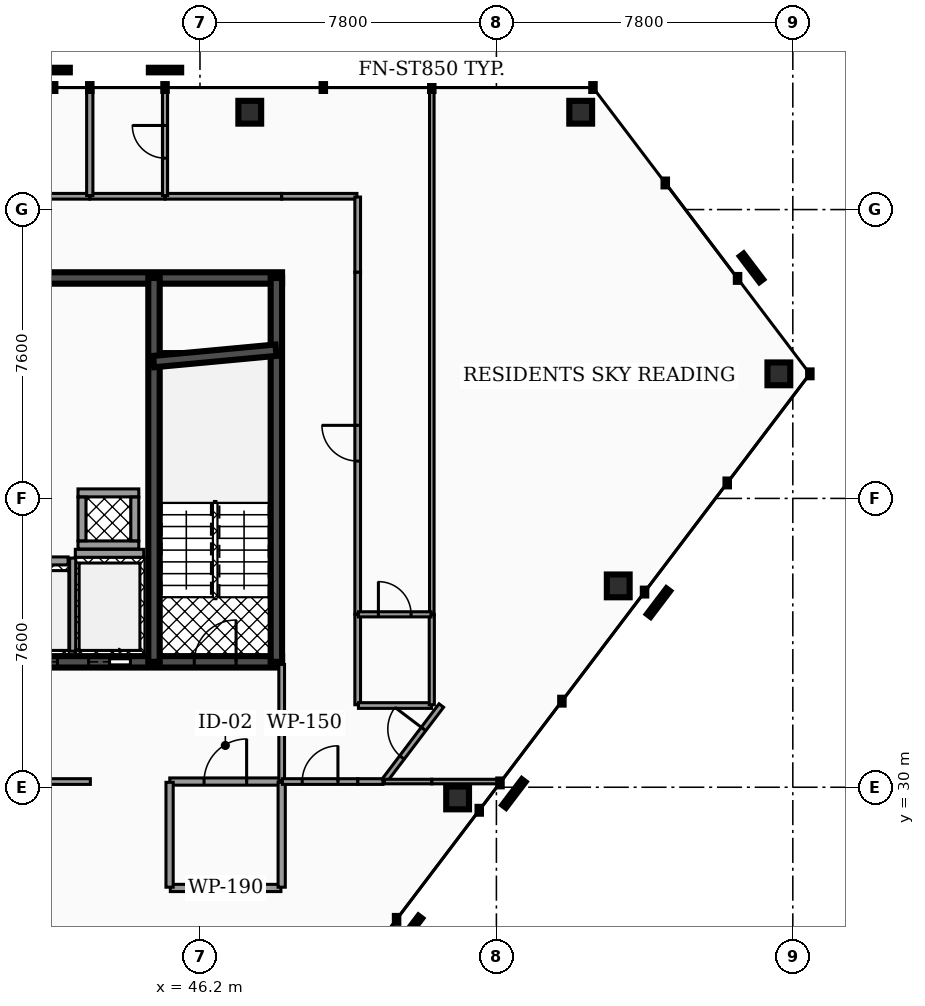
"""IFC4 building model, lengths in metres.
Left out: names, types, materials, properties, quantities, classifications, styles, units other than length and angle.
Written with IfcOpenShell. Run it as: python <this file> out.ifc"""

import sys

from ifc_helpers import new_model, si_unit, direction, frame, frame_2d, origin, origin_2d, place, context, subcontext, project, spatial, rectangle, hollow_rectangle, extrude, element, fill, save


model = new_model("IFC4")
c1 = context("Model", 3, precision=1e-05, world=origin(), true_north=direction((0.0, 1.0)))
c2 = subcontext(c1, "Body", "Model", "MODEL_VIEW")
j1 = project(units=[si_unit("LENGTHUNIT", "METRE"), si_unit("PLANEANGLEUNIT", "RADIAN")], contexts=[c1])
p1 = place(None, origin())
s1 = spatial("IfcSite", under=j1, at=p1, CompositionType="ELEMENT")
p2 = place(p1, origin())
s2 = spatial("IfcBuilding", under=s1, at=p2, CompositionType="ELEMENT")
p3 = place(p2, frame((0.0, 0.0, 212.16)))
s3 = spatial("IfcBuildingStorey", under=s2, at=p3, CompositionType="ELEMENT", Elevation=212.16)
p4 = place(p3, frame((28.5, 43.4, 0.0), z_axis=(0.0, 0.0, 1.0), x_axis=(1.0, 0.0, 0.0)))
e1 = element("IfcWall", 1, at=p4, inside=s3, PredefinedType="SHEAR", context=c2, shape_type="SweptSolid", body=[
    extrude(rectangle(XDim=19.86, YDim=0.3, at=frame_2d((9.93, 0.0))), origin(), (0.0, 0.0, 1.0), 3.18),
])
p5 = place(p3, frame((28.5, 33.3, 0.0), z_axis=(0.0, 0.0, 1.0), x_axis=(1.0, 0.0, 0.0)))
e2 = element("IfcWall", 2, at=p5, inside=s3, PredefinedType="SHEAR", context=c2, shape_type="SweptSolid", body=[
    extrude(rectangle(XDim=19.86, YDim=0.3, at=frame_2d((9.93, 0.0))), origin(), (0.0, 0.0, 1.0), 3.18),
])
p6 = place(p5, frame((3.93, 0.0, 0.0)))
e3 = element("IfcOpeningElement", 3, at=p6, cuts=e2, PredefinedType="OPENING", context=c2, shape_type="SweptSolid", body=[
    extrude(rectangle(XDim=1.1, YDim=2.15, at=frame_2d((0.55, 1.075))), frame((0.0, 0.16, 0.0), z_axis=(0.0, -1.0, 0.0), x_axis=(1.0, 0.0, 0.0)), (0.0, 0.0, 1.0), 0.32),
])
p7 = place(p5, frame((14.77, 0.0, 0.0)))
e4 = element("IfcOpeningElement", 4, at=p7, cuts=e2, PredefinedType="OPENING", context=c2, shape_type="SweptSolid", body=[
    extrude(rectangle(XDim=1.1, YDim=2.15, at=frame_2d((0.55, 1.075))), frame((0.0, 0.16, 0.0), z_axis=(0.0, -1.0, 0.0), x_axis=(1.0, 0.0, 0.0)), (0.0, 0.0, 1.0), 0.32),
])
p8 = place(p5, frame((11.25, 0.0, 0.0)))
e5 = element("IfcOpeningElement", 5, at=p8, cuts=e2, PredefinedType="OPENING", context=c2, shape_type="SweptSolid", body=[
    extrude(rectangle(XDim=1.0, YDim=2.1, at=frame_2d((0.5, 1.05))), frame((0.0, 0.16, 0.0), z_axis=(0.0, -1.0, 0.0), x_axis=(1.0, 0.0, 0.0)), (0.0, 0.0, 1.0), 0.32),
])
p9 = place(p5, frame((12.95, 0.0, 0.0)))
e6 = element("IfcOpeningElement", 6, at=p9, cuts=e2, PredefinedType="OPENING", context=c2, shape_type="SweptSolid", body=[
    extrude(rectangle(XDim=1.0, YDim=2.1, at=frame_2d((0.5, 1.05))), frame((0.0, 0.16, 0.0), z_axis=(0.0, -1.0, 0.0), x_axis=(1.0, 0.0, 0.0)), (0.0, 0.0, 1.0), 0.32),
])
p10 = place(p5, frame((5.85, 0.0, 0.0)))
e7 = element("IfcOpeningElement", 7, at=p10, cuts=e2, PredefinedType="OPENING", context=c2, shape_type="SweptSolid", body=[
    extrude(rectangle(XDim=1.0, YDim=2.1, at=frame_2d((0.5, 1.05))), frame((0.0, 0.16, 0.0), z_axis=(0.0, -1.0, 0.0), x_axis=(1.0, 0.0, 0.0)), (0.0, 0.0, 1.0), 0.32),
])
p11 = place(p5, frame((1.21, 0.0, 0.0)))
e8 = element("IfcOpeningElement", 8, at=p11, cuts=e2, PredefinedType="OPENING", context=c2, shape_type="SweptSolid", body=[
    extrude(rectangle(XDim=1.1, YDim=2.2, at=frame_2d((0.55, 1.1))), frame((0.0, 0.16, 0.0), z_axis=(0.0, -1.0, 0.0), x_axis=(1.0, 0.0, 0.0)), (0.0, 0.0, 1.0), 0.32),
])
p12 = place(p5, frame((9.34, 0.0, 0.0)))
e9 = element("IfcOpeningElement", 9, at=p12, cuts=e2, PredefinedType="OPENING", context=c2, shape_type="SweptSolid", body=[
    extrude(rectangle(XDim=1.12, YDim=2.05, at=frame_2d((0.56, 1.025))), frame((0.0, 0.16, 0.0), z_axis=(0.0, -1.0, 0.0), x_axis=(1.0, 0.0, 0.0)), (0.0, 0.0, 1.0), 0.32),
])
p13 = place(p5, frame((17.55, 0.0, 0.0)))
e10 = element("IfcOpeningElement", 10, at=p13, cuts=e2, PredefinedType="OPENING", context=c2, shape_type="SweptSolid", body=[
    extrude(rectangle(XDim=1.1, YDim=2.2, at=frame_2d((0.55, 1.1))), frame((0.0, 0.16, 0.0), z_axis=(0.0, -1.0, 0.0), x_axis=(1.0, 0.0, 0.0)), (0.0, 0.0, 1.0), 0.32),
])
for number, where, z_axis, x_axis in (
    (11, (44.99, 33.3, 0.0), (0.0, 0.0, 1.0), (0.0, 1.0, 0.0)),
    (12, (48.21, 33.3, 0.0), (0.0, 0.0, 1.0), (0.0, 1.0, 0.0)),
):
    element("IfcWall", number, at=place(p3, frame(where, z_axis=z_axis, x_axis=x_axis)), inside=s3, PredefinedType="SHEAR", context=c2, shape_type="SweptSolid", body=[
        extrude(rectangle(XDim=10.1, YDim=0.3, at=frame_2d((5.05, 0.0))), origin(), (0.0, 0.0, 1.0), 3.18),
    ])
p14 = place(p3, frame((44.98, 41.2, 0.0), z_axis=(0.0, 0.0, 1.0), x_axis=(0.995686468965, 0.09278176286, 0.0)))
e13 = element("IfcWall", 13, at=p14, inside=s3, PredefinedType="SHEAR", context=c2, shape_type="SweptSolid", body=[
    extrude(rectangle(XDim=3.234, YDim=0.3, at=frame_2d((1.617, 0.0))), origin(), (0.0, 0.0, 1.0), 3.18),
])
for number, where, z_axis, x_axis in (
    (14, (56.218, 47.761, 0.0), (0.0, 0.0, 1.0), (1.0, 0.0, 0.0)),
    (15, (47.51, 47.761, 0.0), (0.0, 0.0, 1.0), (1.0, 0.0, 0.0)),
    (16, (52.979, 29.719, 0.0), (0.0, 0.0, 1.0), (1.0, 0.0, 0.0)),
    (17, (57.206, 35.298, 0.0), (0.0, 0.0, 1.0), (1.0, 0.0, 0.0)),
    (18, (61.433, 40.878, 0.0), (0.0, 0.0, 1.0), (1.0, 0.0, 0.0)),
):
    element("IfcColumn", number, at=place(p3, frame(where, z_axis=z_axis, x_axis=x_axis)), inside=s3, PredefinedType="COLUMN", context=c2, shape_type="SweptSolid", body=[
        extrude(hollow_rectangle(XDim=0.6, YDim=0.6, WallThickness=0.03, at=origin_2d()), origin(), (0.0, 0.0, 1.0), 3.18),
    ])
p15 = place(p3, frame((42.92, 36.155, 0.0), z_axis=(0.0, 0.0, 1.0), x_axis=(1.0, 0.0, 0.0)))
e19 = element("IfcWall", 19, at=p15, inside=s3, PredefinedType="SOLIDWALL", context=c2, shape_type="SweptSolid", body=[
    extrude(rectangle(XDim=1.8, YDim=0.21, at=frame_2d((0.9, 0.0))), origin(), (0.0, 0.0, 1.0), 3.18),
])
p16 = place(p3, frame((42.85, 33.58, 0.0), z_axis=(0.0, 0.0, 1.0), x_axis=(0.0, 1.0, 0.0)))
e20 = element("IfcWall", 20, at=p16, inside=s3, PredefinedType="SOLIDWALL", context=c2, shape_type="SweptSolid", body=[
    extrude(rectangle(XDim=2.45, YDim=0.16, at=frame_2d((1.225, 0.0))), origin(), (0.0, 0.0, 1.0), 3.18),
])
p17 = place(p3, frame((41.17, 35.955, 0.0), z_axis=(0.0, 0.0, 1.0), x_axis=(1.0, 0.0, 0.0)))
e21 = element("IfcWall", 21, at=p17, inside=s3, PredefinedType="SOLIDWALL", context=c2, shape_type="SweptSolid", body=[
    extrude(rectangle(XDim=1.56, YDim=0.21, at=frame_2d((0.78, 0.0))), origin(), (0.0, 0.0, 1.0), 3.18),
])
for number, where, z_axis, x_axis in (
    (22, (42.99, 36.375, 0.0), (0.0, 0.0, 1.0), (1.0, 0.0, 0.0)),
    (23, (42.99, 37.745, 0.0), (0.0, 0.0, 1.0), (1.0, 0.0, 0.0)),
):
    element("IfcWall", number, at=place(p3, frame(where, z_axis=z_axis, x_axis=x_axis)), inside=s3, PredefinedType="SOLIDWALL", context=c2, shape_type="SweptSolid", body=[
        extrude(rectangle(XDim=1.6, YDim=0.21, at=frame_2d((0.8, 0.0))), origin(), (0.0, 0.0, 1.0), 3.18),
    ])
for number, where, z_axis, x_axis in (
    (24, (43.095, 36.485, 0.0), (0.0, 0.0, 1.0), (0.0, 1.0, 0.0)),
    (25, (44.485, 36.485, 0.0), (0.0, 0.0, 1.0), (0.0, 1.0, 0.0)),
):
    element("IfcWall", number, at=place(p3, frame(where, z_axis=z_axis, x_axis=x_axis)), inside=s3, PredefinedType="SOLIDWALL", context=c2, shape_type="SweptSolid", body=[
        extrude(rectangle(XDim=1.15, YDim=0.21, at=frame_2d((0.575, 0.0))), origin(), (0.0, 0.0, 1.0), 3.18),
    ])
p18 = place(p3, frame((45.405, 30.15, 0.0), z_axis=(0.0, 0.0, 1.0), x_axis=(1.0, 0.0, 0.0)))
e26 = element("IfcWall", 26, at=p18, inside=s3, PredefinedType="PARTITIONING", context=c2, shape_type="SweptSolid", body=[
    extrude(rectangle(XDim=2.925, YDim=0.19, at=frame_2d((1.462, 0.0))), origin(), (0.0, 0.0, 1.0), 2.235),
])
p19 = place(p18, frame((0.903, 0.0, 0.0)))
e27 = element("IfcOpeningElement", 27, at=p19, cuts=e26, PredefinedType="OPENING", context=c2, shape_type="SweptSolid", body=[
    extrude(rectangle(XDim=1.12, YDim=2.05, at=frame_2d((0.56, 1.025))), frame((0.0, 0.105, 0.0), z_axis=(0.0, -1.0, 0.0), x_axis=(1.0, 0.0, 0.0)), (0.0, 0.0, 1.0), 0.21),
])
p20 = place(p3, frame((48.35, 30.17, 0.0), z_axis=(0.0, 0.0, 1.0), x_axis=(0.0, 1.0, 0.0)))
e28 = element("IfcWall", 28, at=p20, inside=s3, PredefinedType="PARTITIONING", context=c2, shape_type="SweptSolid", body=[
    extrude(rectangle(XDim=3.06, YDim=0.15, at=frame_2d((1.53, 0.0))), origin(), (0.0, 0.0, 1.0), 2.235),
])
p21 = place(p3, frame((33.485, 30.15, 0.0), z_axis=(0.0, 0.0, 1.0), x_axis=(1.0, 0.0, 0.0)))
e29 = element("IfcWall", 29, at=p21, inside=s3, PredefinedType="PARTITIONING", context=c2, shape_type="SweptSolid", body=[
    extrude(rectangle(XDim=9.83, YDim=0.15, at=frame_2d((4.915, 0.0))), origin(), (0.0, 0.0, 1.0), 2.235),
])
p22 = place(p21, frame((0.445, 0.0, 0.0)))
e30 = element("IfcOpeningElement", 30, at=p22, cuts=e29, PredefinedType="OPENING", context=c2, shape_type="SweptSolid", body=[
    extrude(rectangle(XDim=0.94, YDim=2.05, at=frame_2d((0.47, 1.025))), frame((0.0, 0.085, 0.0), z_axis=(0.0, -1.0, 0.0), x_axis=(1.0, 0.0, 0.0)), (0.0, 0.0, 1.0), 0.17),
])
p23 = place(p3, frame((45.42, 27.35, 0.0), z_axis=(0.0, 0.0, 1.0), x_axis=(1.0, 0.0, 0.0)))
e31 = element("IfcWall", 31, at=p23, inside=s3, PredefinedType="PARTITIONING", context=c2, shape_type="SweptSolid", body=[
    extrude(rectangle(XDim=2.91, YDim=0.19, at=frame_2d((1.455, 0.0))), origin(), (0.0, 0.0, 1.0), 2.235),
])
for number, where, z_axis, x_axis in (
    (32, (45.4, 27.37, 0.0), (0.0, 0.0, 1.0), (0.0, 1.0, 0.0)),
    (33, (48.35, 27.37, 0.0), (0.0, 0.0, 1.0), (0.0, 1.0, 0.0)),
):
    element("IfcWall", number, at=place(p3, frame(where, z_axis=z_axis, x_axis=x_axis)), inside=s3, PredefinedType="PARTITIONING", context=c2, shape_type="SweptSolid", body=[
        extrude(rectangle(XDim=2.76, YDim=0.19, at=frame_2d((1.38, 0.0))), origin(), (0.0, 0.0, 1.0), 2.235),
    ])
p24 = place(p3, frame((50.35, 30.15, 0.0), z_axis=(0.0, 0.0, 1.0), x_axis=(1.0, 0.0, 0.0)))
e34 = element("IfcWall", 34, at=p24, inside=s3, PredefinedType="PARTITIONING", context=c2, shape_type="SweptSolid", body=[
    extrude(rectangle(XDim=0.665, YDim=0.15, at=frame_2d((0.333, 0.0))), origin(), (0.0, 0.0, 1.0), 2.235),
])
p25 = place(p3, frame((48.37, 30.15, 0.0), z_axis=(0.0, 0.0, 1.0), x_axis=(1.0, 0.0, 0.0)))
e35 = element("IfcWall", 35, at=p25, inside=s3, PredefinedType="PARTITIONING", context=c2, shape_type="SweptSolid", body=[
    extrude(rectangle(XDim=1.98, YDim=0.15, at=frame_2d((0.99, 0.0))), origin(), (0.0, 0.0, 1.0), 2.235),
])
p26 = place(p25, frame((0.52, 0.0, 0.0)))
e36 = element("IfcOpeningElement", 36, at=p26, cuts=e35, PredefinedType="OPENING", context=c2, shape_type="SweptSolid", body=[
    extrude(rectangle(XDim=0.94, YDim=2.05, at=frame_2d((0.47, 1.025))), frame((0.0, 0.085, 0.0), z_axis=(0.0, -1.0, 0.0), x_axis=(1.0, 0.0, 0.0)), (0.0, 0.0, 1.0), 0.17),
])
p27 = place(p3, frame((51.047, 30.166, 0.0), z_axis=(0.0, 0.0, 1.0), x_axis=(0.60385391082, 0.797095009637, 0.0)))
e37 = element("IfcWall", 37, at=p27, inside=s3, PredefinedType="PARTITIONING", context=c2, shape_type="SweptSolid", body=[
    extrude(rectangle(XDim=2.489, YDim=0.15, at=frame_2d((1.245, 0.0))), origin(), (0.0, 0.0, 1.0), 2.235),
])
p28 = place(p27, frame((0.775, 0.0, 0.0)))
e38 = element("IfcOpeningElement", 38, at=p28, cuts=e37, PredefinedType="OPENING", context=c2, shape_type="SweptSolid", body=[
    extrude(rectangle(XDim=0.94, YDim=2.05, at=frame_2d((0.47, 1.025))), frame((0.0, 0.085, 0.0), z_axis=(0.0, -1.0, 0.0), x_axis=(1.0, 0.0, 0.0)), (0.0, 0.0, 1.0), 0.17),
])
p29 = place(p3, frame((45.285, 45.55, 0.0), z_axis=(0.0, 0.0, 1.0), x_axis=(1.0, 0.0, 0.0)))
e39 = element("IfcWall", 39, at=p29, inside=s3, PredefinedType="PARTITIONING", context=c2, shape_type="SweptSolid", body=[
    extrude(rectangle(XDim=3.065, YDim=0.15, at=frame_2d((1.533, 0.0))), origin(), (0.0, 0.0, 1.0), 2.235),
])
for number, where, z_axis, x_axis in (
    (40, (48.35, 45.55, 0.0), (0.0, 0.0, 1.0), (1.0, 0.0, 0.0)),
    (41, (50.35, 43.55, 0.0), (0.0, 0.0, 1.0), (0.0, 1.0, 0.0)),
):
    element("IfcWall", number, at=place(p3, frame(where, z_axis=z_axis, x_axis=x_axis)), inside=s3, PredefinedType="PARTITIONING", context=c2, shape_type="SweptSolid", body=[
        extrude(rectangle(XDim=1.98, YDim=0.15, at=frame_2d((0.99, 0.0))), origin(), (0.0, 0.0, 1.0), 2.235),
    ])
p30 = place(p3, frame((50.35, 34.555, 0.0), z_axis=(0.0, 0.0, 1.0), x_axis=(0.0, 1.0, 0.0)))
e42 = element("IfcWall", 42, at=p30, inside=s3, PredefinedType="PARTITIONING", context=c2, shape_type="SweptSolid", body=[
    extrude(rectangle(XDim=8.995, YDim=0.15, at=frame_2d((4.498, 0.0))), origin(), (0.0, 0.0, 1.0), 2.235),
])
p31 = place(p30, frame((4.028, 0.0, 0.0)))
e43 = element("IfcOpeningElement", 43, at=p31, cuts=e42, PredefinedType="OPENING", context=c2, shape_type="SweptSolid", body=[
    extrude(rectangle(XDim=0.94, YDim=2.05, at=frame_2d((0.47, 1.025))), frame((0.0, 0.085, 0.0), z_axis=(0.0, -1.0, 0.0), x_axis=(1.0, 0.0, 0.0)), (0.0, 0.0, 1.0), 0.17),
])
p32 = place(p3, frame((43.305, 45.55, 0.0), z_axis=(0.0, 0.0, 1.0), x_axis=(1.0, 0.0, 0.0)))
e44 = element("IfcWall", 44, at=p32, inside=s3, PredefinedType="PARTITIONING", context=c2, shape_type="SweptSolid", body=[
    extrude(rectangle(XDim=1.97, YDim=0.15, at=frame_2d((0.985, 0.0))), origin(), (0.0, 0.0, 1.0), 2.235),
])
p33 = place(p3, frame((50.35, 32.17, 0.0), z_axis=(0.0, 0.0, 1.0), x_axis=(0.0, 1.0, 0.0)))
e45 = element("IfcWall", 45, at=p33, inside=s3, PredefinedType="PARTITIONING", context=c2, shape_type="SweptSolid", body=[
    extrude(rectangle(XDim=2.375, YDim=0.15, at=frame_2d((1.188, 0.0))), origin(), (0.0, 0.0, 1.0), 2.235),
])
p34 = place(p3, frame((50.37, 32.15, 0.0), z_axis=(0.0, 0.0, 1.0), x_axis=(1.0, 0.0, 0.0)))
e46 = element("IfcWall", 46, at=p34, inside=s3, PredefinedType="PARTITIONING", context=c2, shape_type="SweptSolid", body=[
    extrude(rectangle(XDim=1.925, YDim=0.15, at=frame_2d((0.962, 0.0))), origin(), (0.0, 0.0, 1.0), 2.235),
])
p35 = place(p3, frame((40.894, 45.55, 0.0), z_axis=(0.0, 0.0, 1.0), x_axis=(1.0, 0.0, 0.0)))
e47 = element("IfcWall", 47, at=p35, inside=s3, PredefinedType="PARTITIONING", context=c2, shape_type="SweptSolid", body=[
    extrude(rectangle(XDim=2.401, YDim=0.15, at=frame_2d((1.2, 0.0))), origin(), (0.0, 0.0, 1.0), 2.235),
])
p36 = place(p3, frame((51.055, 30.15, 0.0), z_axis=(0.0, 0.0, 1.0), x_axis=(1.0, 0.0, 0.0)))
e48 = element("IfcWall", 48, at=p36, inside=s3, PredefinedType="PARTITIONING", context=c2, shape_type="SweptSolid", body=[
    extrude(rectangle(XDim=1.245, YDim=0.12, at=frame_2d((0.623, 0.0))), origin(), (0.0, 0.0, 1.0), 2.235),
])
p37 = place(p3, frame((52.3, 30.15, 0.0), z_axis=(0.0, 0.0, 1.0), x_axis=(1.0, 0.0, 0.0)))
e49 = element("IfcWall", 49, at=p37, inside=s3, PredefinedType="PARTITIONING", context=c2, shape_type="SweptSolid", body=[
    extrude(rectangle(XDim=1.806, YDim=0.12, at=frame_2d((0.903, 0.0))), origin(), (0.0, 0.0, 1.0), 2.235),
])
p38 = place(p3, frame((52.3, 34.555, 0.0), z_axis=(0.0, 0.0, 1.0), x_axis=(0.0, 1.0, 0.0)))
e50 = element("IfcWall", 50, at=p38, inside=s3, PredefinedType="PARTITIONING", context=c2, shape_type="SweptSolid", body=[
    extrude(rectangle(XDim=13.841, YDim=0.12, at=frame_2d((6.92, 0.0))), origin(), (0.0, 0.0, 1.0), 2.235),
])
p39 = place(p3, frame((52.3, 32.17, 0.0), z_axis=(0.0, 0.0, 1.0), x_axis=(0.0, 1.0, 0.0)))
e51 = element("IfcWall", 51, at=p39, inside=s3, PredefinedType="PARTITIONING", context=c2, shape_type="SweptSolid", body=[
    extrude(rectangle(XDim=2.375, YDim=0.135, at=frame_2d((1.188, 0.0))), origin(), (0.0, 0.0, 1.0), 2.235),
])
p40 = place(p3, frame((45.28, 45.57, 0.0), z_axis=(0.0, 0.0, 1.0), x_axis=(0.0, 1.0, 0.0)))
e52 = element("IfcWall", 52, at=p40, inside=s3, PredefinedType="PARTITIONING", context=c2, shape_type="SweptSolid", body=[
    extrude(rectangle(XDim=2.826, YDim=0.135, at=frame_2d((1.413, 0.0))), origin(), (0.0, 0.0, 1.0), 2.235),
])
p41 = place(p40, frame((0.983, 0.0, 0.0)))
e53 = element("IfcOpeningElement", 53, at=p41, cuts=e52, PredefinedType="OPENING", context=c2, shape_type="SweptSolid", body=[
    extrude(rectangle(XDim=0.86, YDim=2.05, at=frame_2d((0.43, 1.025))), frame((0.0, 0.077, 0.0), z_axis=(0.0, -1.0, 0.0), x_axis=(1.0, 0.0, 0.0)), (0.0, 0.0, 1.0), 0.155),
])
p42 = place(p3, frame((50.37, 34.55, 0.0), z_axis=(0.0, 0.0, 1.0), x_axis=(1.0, 0.0, 0.0)))
e54 = element("IfcWall", 54, at=p42, inside=s3, PredefinedType="PARTITIONING", context=c2, shape_type="SweptSolid", body=[
    extrude(rectangle(XDim=1.91, YDim=0.135, at=frame_2d((0.955, 0.0))), origin(), (0.0, 0.0, 1.0), 2.235),
])
p43 = place(p42, frame((0.525, 0.0, 0.0)))
e55 = element("IfcOpeningElement", 55, at=p43, cuts=e54, PredefinedType="OPENING", context=c2, shape_type="SweptSolid", body=[
    extrude(rectangle(XDim=0.86, YDim=2.05, at=frame_2d((0.43, 1.025))), frame((0.0, 0.077, 0.0), z_axis=(0.0, -1.0, 0.0), x_axis=(1.0, 0.0, 0.0)), (0.0, 0.0, 1.0), 0.155),
])
p44 = place(p3, frame((43.3, 45.57, 0.0), z_axis=(0.0, 0.0, 1.0), x_axis=(0.0, 1.0, 0.0)))
e56 = element("IfcWall", 56, at=p44, inside=s3, PredefinedType="PARTITIONING", context=c2, shape_type="SweptSolid", body=[
    extrude(rectangle(XDim=2.826, YDim=0.165, at=frame_2d((1.413, 0.0))), origin(), (0.0, 0.0, 1.0), 2.235),
])
p45 = place(p7, origin())
e57 = element("IfcDoor", 57, at=p45, inside=s3, OperationType="SLIDING_TO_RIGHT", PredefinedType="DOOR", context=c2, shape_type="SweptSolid", body=[
    extrude(rectangle(XDim=1.1, YDim=2.15, at=frame_2d((0.55, 1.075))), frame((0.0, 0.025, 0.0), z_axis=(0.0, -1.0, 0.0), x_axis=(1.0, 0.0, 0.0)), (0.0, 0.0, 1.0), 0.05),
])
fill(e4, e57)
p46 = place(p9, origin())
e58 = element("IfcDoor", 58, at=p46, inside=s3, OperationType="SLIDING_TO_LEFT", PredefinedType="DOOR", context=c2, shape_type="SweptSolid", body=[
    extrude(rectangle(XDim=1.0, YDim=2.1, at=frame_2d((0.5, 1.05))), frame((0.0, 0.025, 0.0), z_axis=(0.0, -1.0, 0.0), x_axis=(1.0, 0.0, 0.0)), (0.0, 0.0, 1.0), 0.05),
])
fill(e6, e58)
p47 = place(p13, origin())
e59 = element("IfcDoor", 59, at=p47, inside=s3, OperationType="SINGLE_SWING_RIGHT", PredefinedType="DOOR", context=c2, shape_type="SweptSolid", body=[
    extrude(rectangle(XDim=1.1, YDim=2.2, at=frame_2d((0.55, 1.1))), frame((0.0, 0.025, 0.0), z_axis=(0.0, -1.0, 0.0), x_axis=(1.0, 0.0, 0.0)), (0.0, 0.0, 1.0), 0.05),
])
fill(e10, e59)
p48 = place(p19, origin())
e60 = element("IfcDoor", 60, at=p48, inside=s3, OperationType="SINGLE_SWING_RIGHT", PredefinedType="DOOR", context=c2, shape_type="SweptSolid", body=[
    extrude(rectangle(XDim=1.12, YDim=2.05, at=frame_2d((0.56, 1.025))), frame((0.0, 0.025, 0.0), z_axis=(0.0, -1.0, 0.0), x_axis=(1.0, 0.0, 0.0)), (0.0, 0.0, 1.0), 0.05),
])
fill(e27, e60)
p49 = place(p26, origin())
e61 = element("IfcDoor", 61, at=p49, inside=s3, OperationType="SINGLE_SWING_RIGHT", PredefinedType="DOOR", context=c2, shape_type="SweptSolid", body=[
    extrude(rectangle(XDim=0.94, YDim=2.05, at=frame_2d((0.47, 1.025))), frame((0.0, 0.025, 0.0), z_axis=(0.0, -1.0, 0.0), x_axis=(1.0, 0.0, 0.0)), (0.0, 0.0, 1.0), 0.05),
])
fill(e36, e61)
p50 = place(p28, origin())
e62 = element("IfcDoor", 62, at=p50, inside=s3, OperationType="SINGLE_SWING_RIGHT", PredefinedType="DOOR", context=c2, shape_type="SweptSolid", body=[
    extrude(rectangle(XDim=0.94, YDim=2.05, at=frame_2d((0.47, 1.025))), frame((0.0, 0.025, 0.0), z_axis=(0.0, -1.0, 0.0), x_axis=(1.0, 0.0, 0.0)), (0.0, 0.0, 1.0), 0.05),
])
fill(e38, e62)
p51 = place(p31, origin())
e63 = element("IfcDoor", 63, at=p51, inside=s3, OperationType="SINGLE_SWING_RIGHT", PredefinedType="DOOR", context=c2, shape_type="SweptSolid", body=[
    extrude(rectangle(XDim=0.94, YDim=2.05, at=frame_2d((0.47, 1.025))), frame((0.0, 0.025, 0.0), z_axis=(0.0, -1.0, 0.0), x_axis=(1.0, 0.0, 0.0)), (0.0, 0.0, 1.0), 0.05),
])
fill(e43, e63)
p52 = place(p41, origin())
e64 = element("IfcDoor", 64, at=p52, inside=s3, OperationType="SINGLE_SWING_RIGHT", PredefinedType="DOOR", context=c2, shape_type="SweptSolid", body=[
    extrude(rectangle(XDim=0.86, YDim=2.05, at=frame_2d((0.43, 1.025))), frame((0.0, 0.025, 0.0), z_axis=(0.0, -1.0, 0.0), x_axis=(1.0, 0.0, 0.0)), (0.0, 0.0, 1.0), 0.05),
])
fill(e53, e64)
p53 = place(p43, origin())
e65 = element("IfcDoor", 65, at=p53, inside=s3, OperationType="SINGLE_SWING_LEFT", PredefinedType="DOOR", context=c2, shape_type="SweptSolid", body=[
    extrude(rectangle(XDim=0.86, YDim=2.05, at=frame_2d((0.43, 1.025))), frame((0.0, 0.025, 0.0), z_axis=(0.0, -1.0, 0.0), x_axis=(1.0, 0.0, 0.0)), (0.0, 0.0, 1.0), 0.05),
])
fill(e55, e65)
save(model, sys.argv[1])
